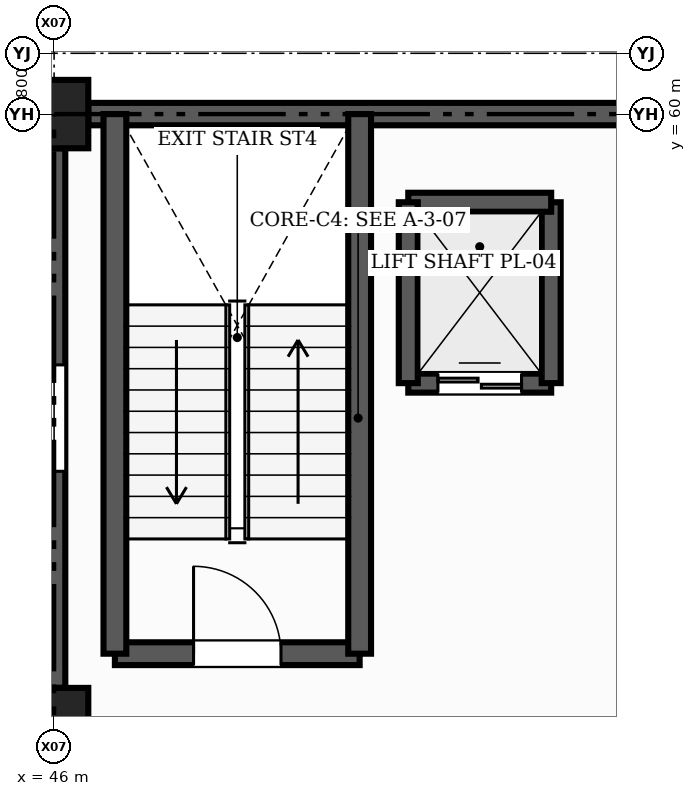
"""IFC4 building model, lengths in metres.
Left out: names, types, materials, properties, quantities, classifications, styles, units other than length and angle.
Written with IfcOpenShell. Run it as: python <this file> out.ifc"""

import sys

from ifc_helpers import new_model, si_unit, direction, frame, frame_2d, origin, origin_2d, place, context, subcontext, project, spatial, rectangle, extrude, element, fill, save


model = new_model("IFC4")
c1 = context("Model", 3, precision=1e-05, world=origin(), true_north=direction((0.0, 1.0)))
c2 = subcontext(c1, "Body", "Model", "MODEL_VIEW")
j1 = project(units=[si_unit("LENGTHUNIT", "METRE"), si_unit("PLANEANGLEUNIT", "RADIAN")], contexts=[c1])
p1 = place(None, origin())
s1 = spatial("IfcSite", under=j1, at=p1, CompositionType="ELEMENT")
p2 = place(p1, origin())
s2 = spatial("IfcBuilding", under=s1, at=p2, CompositionType="ELEMENT")
p3 = place(p2, frame((0.0, 0.0, 4.8)))
s3 = spatial("IfcBuildingStorey", under=s2, at=p3, CompositionType="ELEMENT", Elevation=4.8)
for number, where, z_axis, x_axis in (
    (1, (46.0, 52.0, 0.0), (0.0, 0.0, 1.0), (1.0, 0.0, 0.0)),
    (2, (46.0, 60.0, 0.0), (0.0, 0.0, 1.0), (1.0, 0.0, 0.0)),
):
    element("IfcColumn", number, at=place(p3, frame(where, z_axis=z_axis, x_axis=x_axis)), inside=s3, PredefinedType="COLUMN", context=c2, shape_type="SweptSolid", body=[
        extrude(rectangle(XDim=0.9, YDim=0.9, at=origin_2d()), origin(), (0.0, 0.0, 1.0), 4.2),
    ])
p4 = place(p3, frame((53.7, 60.0, 0.0), z_axis=(0.0, 0.0, 1.0), x_axis=(-1.0, 0.0, 0.0)))
e3 = element("IfcWall", 3, at=p4, inside=s3, PredefinedType="SOLIDWALL", context=c2, shape_type="SweptSolid", body=[
    extrude(rectangle(XDim=7.25, YDim=0.295, at=frame_2d((3.625, 0.0))), origin(), (0.0, 0.0, 1.0), 3.91),
])
p5 = place(p3, frame((46.0, 59.55, 0.0), z_axis=(0.0, 0.0, 1.0), x_axis=(0.0, -1.0, 0.0)))
e4 = element("IfcWall", 4, at=p5, inside=s3, PredefinedType="SOLIDWALL", context=c2, shape_type="SweptSolid", body=[
    extrude(rectangle(XDim=7.1, YDim=0.295, at=frame_2d((3.55, 0.0))), origin(), (0.0, 0.0, 1.0), 3.91),
])
p6 = place(p5, frame((2.85, 0.0, 0.9)))
e5 = element("IfcOpeningElement", 5, at=p6, cuts=e4, PredefinedType="OPENING", context=c2, shape_type="SweptSolid", body=[
    extrude(rectangle(XDim=1.4, YDim=1.4, at=frame_2d((0.7, 0.7))), frame((0.0, 0.157, 0.0), z_axis=(0.0, -1.0, 0.0), x_axis=(1.0, 0.0, 0.0)), (0.0, 0.0, 1.0), 0.315),
])
p7 = place(p3, frame((46.8, 52.9, 0.0), z_axis=(0.0, 0.0, 1.0), x_axis=(1.0, 0.0, 0.0)))
e6 = element("IfcWall", 6, at=p7, inside=s3, PredefinedType="SHEAR", context=c2, shape_type="SweptSolid", body=[
    extrude(rectangle(XDim=3.22, YDim=0.3, at=frame_2d((1.61, 0.0))), origin(), (0.0, 0.0, 1.0), 4.2),
])
p8 = place(p7, frame((1.035, 0.0, 0.0)))
e7 = element("IfcOpeningElement", 7, at=p8, cuts=e6, PredefinedType="OPENING", context=c2, shape_type="SweptSolid", body=[
    extrude(rectangle(XDim=1.15, YDim=2.15, at=frame_2d((0.575, 1.075))), frame((0.0, 0.16, 0.0), z_axis=(0.0, -1.0, 0.0), x_axis=(1.0, 0.0, 0.0)), (0.0, 0.0, 1.0), 0.32),
])
for number, where, z_axis, x_axis in (
    (8, (50.02, 52.9, 0.0), (0.0, 0.0, 1.0), (0.0, 1.0, 0.0)),
    (9, (46.8, 60.0, 0.0), (0.0, 0.0, 1.0), (0.0, -1.0, 0.0)),
):
    element("IfcWall", number, at=place(p3, frame(where, z_axis=z_axis, x_axis=x_axis)), inside=s3, PredefinedType="SHEAR", context=c2, shape_type="SweptSolid", body=[
        extrude(rectangle(XDim=7.1, YDim=0.3, at=frame_2d((3.55, 0.0))), origin(), (0.0, 0.0, 1.0), 4.2),
    ])
p9 = place(p3, frame((50.66, 56.46, 0.0), z_axis=(0.0, 0.0, 1.0), x_axis=(1.0, 0.0, 0.0)))
e10 = element("IfcWall", 10, at=p9, inside=s3, PredefinedType="SHEAR", context=c2, shape_type="SweptSolid", body=[
    extrude(rectangle(XDim=1.88, YDim=0.25, at=frame_2d((0.94, 0.0))), origin(), (0.0, 0.0, 1.0), 4.2),
])
p10 = place(p9, frame((0.39, 0.0, 0.0)))
e11 = element("IfcOpeningElement", 11, at=p10, cuts=e10, PredefinedType="OPENING", context=c2, shape_type="SweptSolid", body=[
    extrude(rectangle(XDim=1.1, YDim=2.2, at=frame_2d((0.55, 1.1))), frame((0.0, 0.135, 0.0), z_axis=(0.0, -1.0, 0.0), x_axis=(1.0, 0.0, 0.0)), (0.0, 0.0, 1.0), 0.27),
])
p11 = place(p3, frame((52.54, 56.46, 0.0), z_axis=(0.0, 0.0, 1.0), x_axis=(0.0, 1.0, 0.0)))
e12 = element("IfcWall", 12, at=p11, inside=s3, PredefinedType="SHEAR", context=c2, shape_type="SweptSolid", body=[
    extrude(rectangle(XDim=2.38, YDim=0.25, at=frame_2d((1.19, 0.0))), origin(), (0.0, 0.0, 1.0), 4.2),
])
p12 = place(p3, frame((52.54, 58.84, 0.0), z_axis=(0.0, 0.0, 1.0), x_axis=(-1.0, 0.0, 0.0)))
e13 = element("IfcWall", 13, at=p12, inside=s3, PredefinedType="SHEAR", context=c2, shape_type="SweptSolid", body=[
    extrude(rectangle(XDim=1.88, YDim=0.25, at=frame_2d((0.94, 0.0))), origin(), (0.0, 0.0, 1.0), 4.2),
])
p13 = place(p3, frame((50.66, 58.84, 0.0), z_axis=(0.0, 0.0, 1.0), x_axis=(0.0, -1.0, 0.0)))
e14 = element("IfcWall", 14, at=p13, inside=s3, PredefinedType="SHEAR", context=c2, shape_type="SweptSolid", body=[
    extrude(rectangle(XDim=2.38, YDim=0.25, at=frame_2d((1.19, 0.0))), origin(), (0.0, 0.0, 1.0), 4.2),
])
p14 = place(p6, origin())
e15 = element("IfcWindow", 15, at=p14, inside=s3, PartitioningType="SINGLE_PANEL", PredefinedType="WINDOW", context=c2, shape_type="SweptSolid", body=[
    extrude(rectangle(XDim=1.4, YDim=1.4, at=frame_2d((0.7, 0.7))), frame((0.0, 0.03, 0.0), z_axis=(0.0, -1.0, 0.0), x_axis=(1.0, 0.0, 0.0)), (0.0, 0.0, 1.0), 0.06),
])
fill(e5, e15)
p15 = place(p8, origin())
e16 = element("IfcDoor", 16, at=p15, inside=s3, OperationType="SINGLE_SWING_LEFT", PredefinedType="DOOR", context=c2, shape_type="SweptSolid", body=[
    extrude(rectangle(XDim=1.15, YDim=2.15, at=frame_2d((0.575, 1.075))), frame((0.0, 0.025, 0.0), z_axis=(0.0, -1.0, 0.0), x_axis=(1.0, 0.0, 0.0)), (0.0, 0.0, 1.0), 0.05),
])
fill(e7, e16)
p16 = place(p10, origin())
e17 = element("IfcDoor", 17, at=p16, inside=s3, OperationType="DOUBLE_DOOR_SLIDING", PredefinedType="DOOR", context=c2, shape_type="SweptSolid", body=[
    extrude(rectangle(XDim=1.1, YDim=2.2, at=frame_2d((0.55, 1.1))), frame((0.0, 0.025, 0.0), z_axis=(0.0, -1.0, 0.0), x_axis=(1.0, 0.0, 0.0)), (0.0, 0.0, 1.0), 0.05),
])
fill(e11, e17)
save(model, sys.argv[1])
